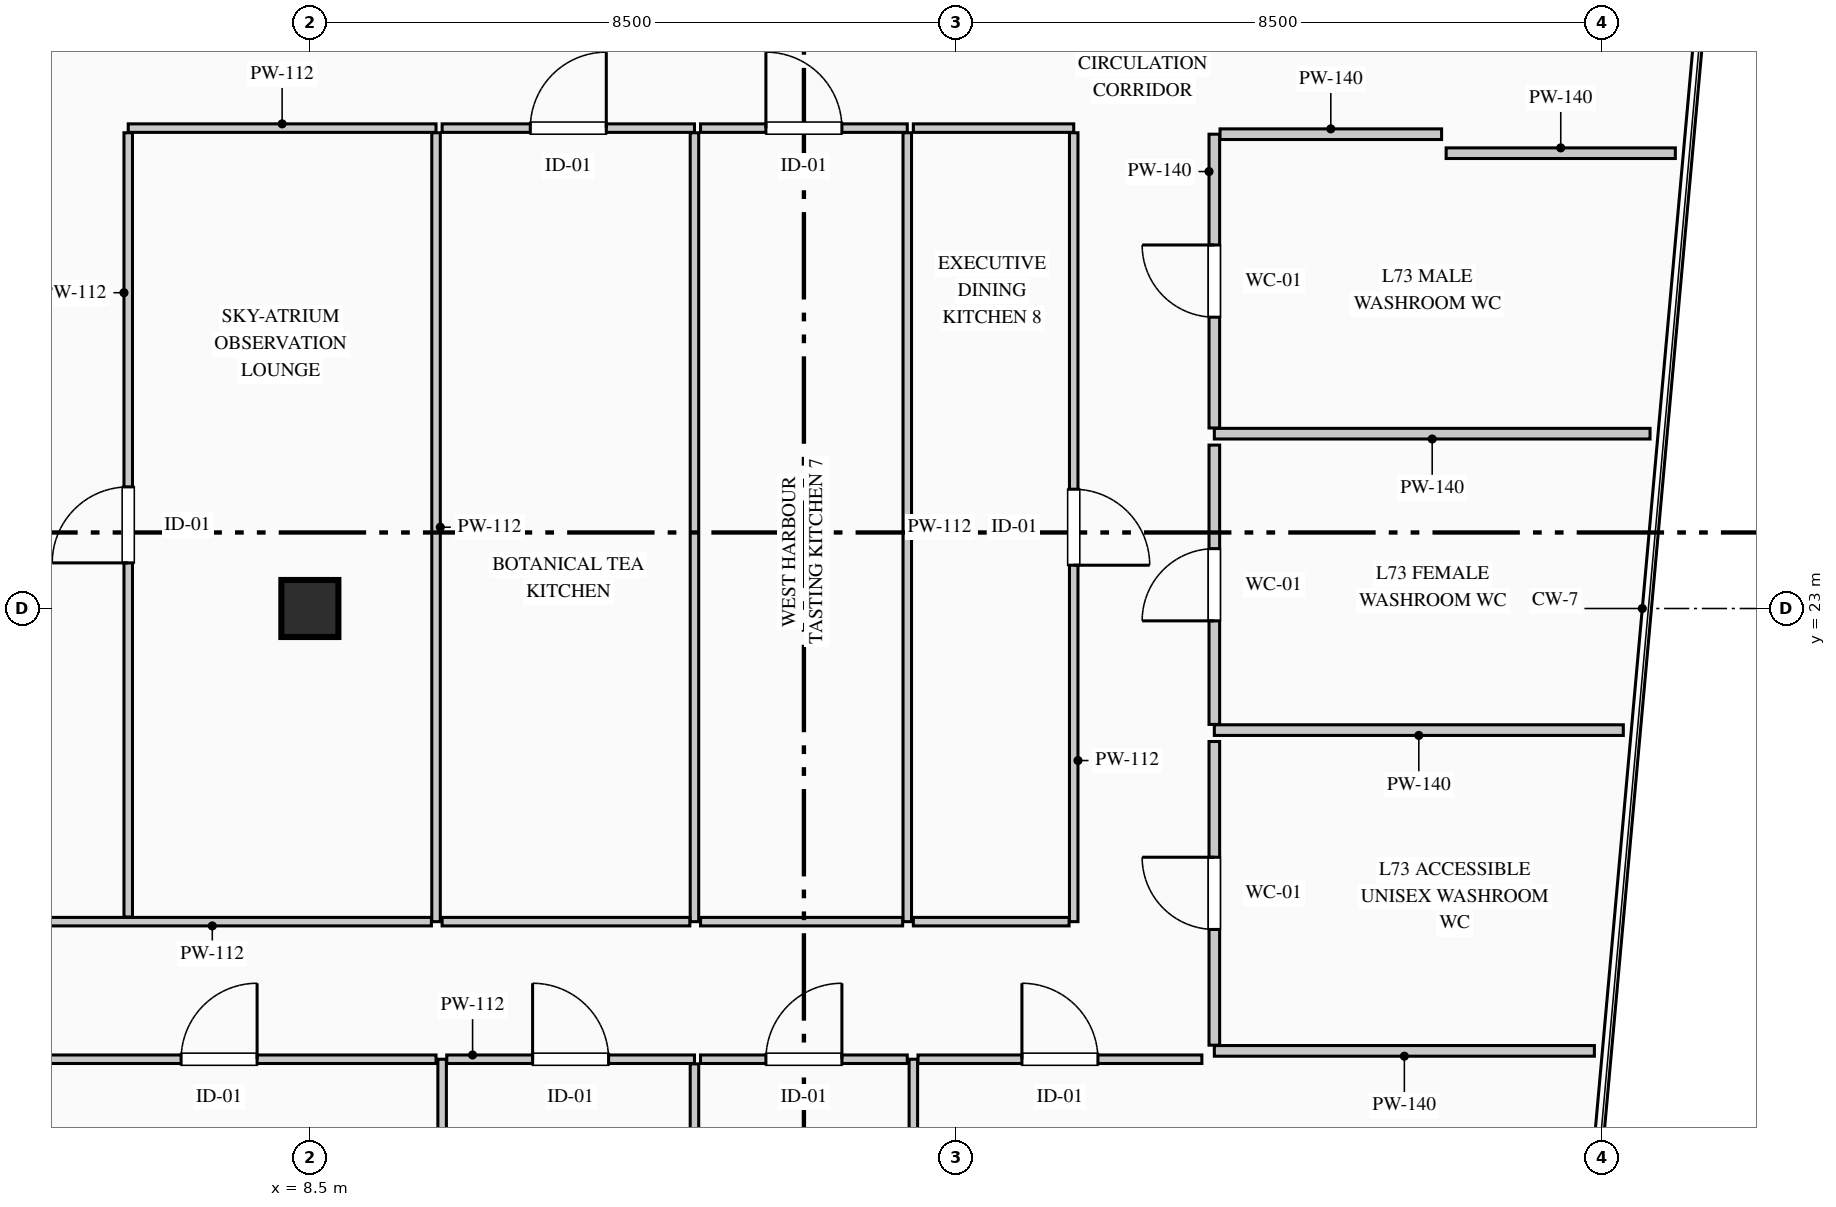
"""IFC4 building model, lengths in metres.
Left out: names, types, materials, properties, quantities, classifications, styles, units other than length and angle.
Written with IfcOpenShell. Run it as: python <this file> out.ifc"""

import sys

from ifc_helpers import new_model, si_unit, direction, frame, frame_2d, origin, origin_2d, place, context, subcontext, project, spatial, rectangle, extrude, element, fill, save


model = new_model("IFC4")
c1 = context("Model", 3, precision=1e-05, world=origin(), true_north=direction((0.0, 1.0)))
c2 = subcontext(c1, "Body", "Model", "MODEL_VIEW")
j1 = project(units=[si_unit("LENGTHUNIT", "METRE"), si_unit("PLANEANGLEUNIT", "RADIAN")], contexts=[c1])
p1 = place(None, origin())
s1 = spatial("IfcSite", under=j1, at=p1, CompositionType="ELEMENT")
p2 = place(p1, origin())
s2 = spatial("IfcBuilding", under=s1, at=p2, CompositionType="ELEMENT")
p3 = place(p2, frame((0.0, 0.0, 304.1)))
s3 = spatial("IfcBuildingStorey", under=s2, at=p3, CompositionType="ELEMENT", Elevation=304.1)
p4 = place(p3, frame((8.5, 23.0, 0.0), z_axis=(0.0, 0.0, 1.0), x_axis=(1.0, 0.0, 0.0)))
e1 = element("IfcColumn", 1, at=p4, inside=s3, PredefinedType="COLUMN", context=c2, shape_type="SweptSolid", body=[
    extrude(rectangle(XDim=0.75, YDim=0.75, at=origin_2d()), origin(), (0.0, 0.0, 1.0), 3.95),
])
p5 = place(p3, frame((23.45, 28.99, 0.0), z_axis=(0.0, 0.0, 1.0), x_axis=(1.0, 0.0, 0.0)))
e2 = element("IfcWall", 2, at=p5, inside=s3, PredefinedType="PARTITIONING", context=c2, shape_type="SweptSolid", body=[
    extrude(rectangle(XDim=3.016, YDim=0.14, at=frame_2d((1.508, 0.0))), origin(), (0.0, 0.0, 1.0), 3.7),
])
p6 = place(p3, frame((26.133, 25.3, 0.0), z_axis=(0.0, 0.0, 1.0), x_axis=(-1.0, 0.0, 0.0)))
e3 = element("IfcWall", 3, at=p6, inside=s3, PredefinedType="PARTITIONING", context=c2, shape_type="SweptSolid", body=[
    extrude(rectangle(XDim=5.733, YDim=0.14, at=frame_2d((2.866, 0.0))), origin(), (0.0, 0.0, 1.0), 3.7),
])
p7 = place(p3, frame((20.4, 25.375, 0.0), z_axis=(0.0, 0.0, 1.0), x_axis=(0.0, 1.0, 0.0)))
e4 = element("IfcWall", 4, at=p7, inside=s3, PredefinedType="PARTITIONING", context=c2, shape_type="SweptSolid", body=[
    extrude(rectangle(XDim=3.865, YDim=0.14, at=frame_2d((1.933, 0.0))), origin(), (0.0, 0.0, 1.0), 3.7),
])
p8 = place(p7, frame((1.458, 0.0, 0.0)))
e5 = element("IfcOpeningElement", 5, at=p8, cuts=e4, PredefinedType="OPENING", context=c2, shape_type="SweptSolid", body=[
    extrude(rectangle(XDim=0.95, YDim=2.15, at=frame_2d((0.475, 1.075))), frame((0.0, 0.08, 0.0), z_axis=(0.0, -1.0, 0.0), x_axis=(1.0, 0.0, 0.0)), (0.0, 0.0, 1.0), 0.16),
])
p9 = place(p3, frame((20.475, 29.24, 0.0), z_axis=(0.0, 0.0, 1.0), x_axis=(1.0, 0.0, 0.0)))
e6 = element("IfcWall", 6, at=p9, inside=s3, PredefinedType="PARTITIONING", context=c2, shape_type="SweptSolid", body=[
    extrude(rectangle(XDim=2.915, YDim=0.14, at=frame_2d((1.458, 0.0))), origin(), (0.0, 0.0, 1.0), 3.7),
])
p10 = place(p3, frame((25.781, 21.4, 0.0), z_axis=(0.0, 0.0, 1.0), x_axis=(-1.0, 0.0, 0.0)))
e7 = element("IfcWall", 7, at=p10, inside=s3, PredefinedType="PARTITIONING", context=c2, shape_type="SweptSolid", body=[
    extrude(rectangle(XDim=5.381, YDim=0.14, at=frame_2d((2.69, 0.0))), origin(), (0.0, 0.0, 1.0), 3.7),
])
p11 = place(p3, frame((20.4, 21.475, 0.0), z_axis=(0.0, 0.0, 1.0), x_axis=(0.0, 1.0, 0.0)))
e8 = element("IfcWall", 8, at=p11, inside=s3, PredefinedType="PARTITIONING", context=c2, shape_type="SweptSolid", body=[
    extrude(rectangle(XDim=3.675, YDim=0.14, at=frame_2d((1.837, 0.0))), origin(), (0.0, 0.0, 1.0), 3.7),
])
p12 = place(p11, frame((1.363, 0.0, 0.0)))
e9 = element("IfcOpeningElement", 9, at=p12, cuts=e8, PredefinedType="OPENING", context=c2, shape_type="SweptSolid", body=[
    extrude(rectangle(XDim=0.95, YDim=2.15, at=frame_2d((0.475, 1.075))), frame((0.0, 0.08, 0.0), z_axis=(0.0, -1.0, 0.0), x_axis=(1.0, 0.0, 0.0)), (0.0, 0.0, 1.0), 0.16),
])
p13 = place(p3, frame((25.4, 17.18, 0.0), z_axis=(0.0, 0.0, 1.0), x_axis=(-1.0, 0.0, 0.0)))
e10 = element("IfcWall", 10, at=p13, inside=s3, PredefinedType="PARTITIONING", context=c2, shape_type="SweptSolid", body=[
    extrude(rectangle(XDim=5.0, YDim=0.14, at=frame_2d((2.5, 0.0))), origin(), (0.0, 0.0, 1.0), 3.7),
])
p14 = place(p3, frame((20.4, 17.255, 0.0), z_axis=(0.0, 0.0, 1.0), x_axis=(0.0, 1.0, 0.0)))
e11 = element("IfcWall", 11, at=p14, inside=s3, PredefinedType="PARTITIONING", context=c2, shape_type="SweptSolid", body=[
    extrude(rectangle(XDim=3.995, YDim=0.14, at=frame_2d((1.998, 0.0))), origin(), (0.0, 0.0, 1.0), 3.7),
])
p15 = place(p14, frame((1.522, 0.0, 0.0)))
e12 = element("IfcOpeningElement", 12, at=p15, cuts=e11, PredefinedType="OPENING", context=c2, shape_type="SweptSolid", body=[
    extrude(rectangle(XDim=0.95, YDim=2.15, at=frame_2d((0.475, 1.075))), frame((0.0, 0.08, 0.0), z_axis=(0.0, -1.0, 0.0), x_axis=(1.0, 0.0, 0.0)), (0.0, 0.0, 1.0), 0.16),
])
p16 = place(p3, frame((10.24, 2.745, 0.0), z_axis=(0.0, 0.0, 1.0), x_axis=(0.0, 1.0, 0.0)))
e13 = element("IfcWall", 13, at=p16, inside=s3, PredefinedType="PARTITIONING", context=c2, shape_type="SweptSolid", body=[
    extrude(rectangle(XDim=14.325, YDim=0.112, at=frame_2d((7.163, 0.0))), origin(), (0.0, 0.0, 1.0), 3.325),
])
p17 = place(p3, frame((10.301, 17.07, 0.0), z_axis=(0.0, 0.0, 1.0), x_axis=(1.0, 0.0, 0.0)))
e14 = element("IfcWall", 14, at=p17, inside=s3, PredefinedType="PARTITIONING", context=c2, shape_type="SweptSolid", body=[
    extrude(rectangle(XDim=3.259, YDim=0.112, at=frame_2d((1.629, 0.0))), origin(), (0.0, 0.0, 1.0), 3.7),
])
p18 = place(p17, frame((1.129, 0.0, 0.0)))
e15 = element("IfcOpeningElement", 15, at=p18, cuts=e14, PredefinedType="OPENING", context=c2, shape_type="SweptSolid", body=[
    extrude(rectangle(XDim=1.0, YDim=2.15, at=frame_2d((0.5, 1.075))), frame((0.0, 0.066, 0.0), z_axis=(0.0, -1.0, 0.0), x_axis=(1.0, 0.0, 0.0)), (0.0, 0.0, 1.0), 0.132),
])
p19 = place(p3, frame((13.56, 17.009, 0.0), z_axis=(0.0, 0.0, 1.0), x_axis=(0.0, -1.0, 0.0)))
e16 = element("IfcWall", 16, at=p19, inside=s3, PredefinedType="PARTITIONING", context=c2, shape_type="SweptSolid", body=[
    extrude(rectangle(XDim=11.951, YDim=0.112, at=frame_2d((5.976, 0.0))), origin(), (0.0, 0.0, 1.0), 3.7),
])
p20 = place(p3, frame((4.451, 17.07, 0.0), z_axis=(0.0, 0.0, 1.0), x_axis=(1.0, 0.0, 0.0)))
e17 = element("IfcWall", 17, at=p20, inside=s3, PredefinedType="PARTITIONING", context=c2, shape_type="SweptSolid", body=[
    extrude(rectangle(XDim=5.708, YDim=0.112, at=frame_2d((2.854, 0.0))), origin(), (0.0, 0.0, 1.0), 3.7),
])
p21 = place(p20, frame((2.354, 0.0, 0.0)))
e18 = element("IfcOpeningElement", 18, at=p21, cuts=e17, PredefinedType="OPENING", context=c2, shape_type="SweptSolid", body=[
    extrude(rectangle(XDim=1.0, YDim=2.15, at=frame_2d((0.5, 1.075))), frame((0.0, 0.066, 0.0), z_axis=(0.0, -1.0, 0.0), x_axis=(1.0, 0.0, 0.0)), (0.0, 0.0, 1.0), 0.132),
])
p22 = place(p3, frame((16.44, 10.125, 0.0), z_axis=(0.0, 0.0, 1.0), x_axis=(0.0, 1.0, 0.0)))
e19 = element("IfcWall", 19, at=p22, inside=s3, PredefinedType="PARTITIONING", context=c2, shape_type="SweptSolid", body=[
    extrude(rectangle(XDim=6.945, YDim=0.112, at=frame_2d((3.473, 0.0))), origin(), (0.0, 0.0, 1.0), 3.7),
])
p23 = place(p3, frame((16.501, 17.07, 0.0), z_axis=(0.0, 0.0, 1.0), x_axis=(1.0, 0.0, 0.0)))
e20 = element("IfcWall", 20, at=p23, inside=s3, PredefinedType="PARTITIONING", context=c2, shape_type="SweptSolid", body=[
    extrude(rectangle(XDim=3.735, YDim=0.112, at=frame_2d((1.868, 0.0))), origin(), (0.0, 0.0, 1.0), 3.7),
])
p24 = place(p23, frame((1.367, 0.0, 0.0)))
e21 = element("IfcOpeningElement", 21, at=p24, cuts=e20, PredefinedType="OPENING", context=c2, shape_type="SweptSolid", body=[
    extrude(rectangle(XDim=1.0, YDim=2.15, at=frame_2d((0.5, 1.075))), frame((0.0, 0.066, 0.0), z_axis=(0.0, -1.0, 0.0), x_axis=(1.0, 0.0, 0.0)), (0.0, 0.0, 1.0), 0.132),
])
p25 = place(p3, frame((13.64, 17.07, 0.0), z_axis=(0.0, 0.0, 1.0), x_axis=(1.0, 0.0, 0.0)))
e22 = element("IfcWall", 22, at=p25, inside=s3, PredefinedType="PARTITIONING", context=c2, shape_type="SweptSolid", body=[
    extrude(rectangle(XDim=2.72, YDim=0.112, at=frame_2d((1.36, 0.0))), origin(), (0.0, 0.0, 1.0), 3.7),
])
p26 = place(p25, frame((0.86, 0.0, 0.0)))
e23 = element("IfcOpeningElement", 23, at=p26, cuts=e22, PredefinedType="OPENING", context=c2, shape_type="SweptSolid", body=[
    extrude(rectangle(XDim=1.0, YDim=2.15, at=frame_2d((0.5, 1.075))), frame((0.0, 0.066, 0.0), z_axis=(0.0, -1.0, 0.0), x_axis=(1.0, 0.0, 0.0)), (0.0, 0.0, 1.0), 0.132),
])
p27 = place(p3, frame((6.11, 29.32, 0.0), z_axis=(0.0, 0.0, 1.0), x_axis=(1.0, 0.0, 0.0)))
e24 = element("IfcWall", 24, at=p27, inside=s3, PredefinedType="PARTITIONING", context=c2, shape_type="SweptSolid", body=[
    extrude(rectangle(XDim=4.05, YDim=0.112, at=frame_2d((2.025, 0.0))), origin(), (0.0, 0.0, 1.0), 3.7),
])
p28 = place(p3, frame((10.16, 29.259, 0.0), z_axis=(0.0, 0.0, 1.0), x_axis=(0.0, -1.0, 0.0)))
e25 = element("IfcWall", 25, at=p28, inside=s3, PredefinedType="PARTITIONING", context=c2, shape_type="SweptSolid", body=[
    extrude(rectangle(XDim=10.379, YDim=0.112, at=frame_2d((5.189, 0.0))), origin(), (0.0, 0.0, 1.0), 3.325),
])
p29 = place(p3, frame((10.099, 18.88, 0.0), z_axis=(0.0, 0.0, 1.0), x_axis=(-1.0, 0.0, 0.0)))
e26 = element("IfcWall", 26, at=p29, inside=s3, PredefinedType="PARTITIONING", context=c2, shape_type="SweptSolid", body=[
    extrude(rectangle(XDim=5.766, YDim=0.112, at=frame_2d((2.883, 0.0))), origin(), (0.0, 0.0, 1.0), 3.7),
])
p30 = place(p3, frame((6.11, 18.941, 0.0), z_axis=(0.0, 0.0, 1.0), x_axis=(0.0, 1.0, 0.0)))
e27 = element("IfcWall", 27, at=p30, inside=s3, PredefinedType="PARTITIONING", context=c2, shape_type="SweptSolid", body=[
    extrude(rectangle(XDim=10.318, YDim=0.112, at=frame_2d((5.159, 0.0))), origin(), (0.0, 0.0, 1.0), 3.7),
])
p31 = place(p30, frame((4.659, 0.0, 0.0)))
e28 = element("IfcOpeningElement", 28, at=p31, cuts=e27, PredefinedType="OPENING", context=c2, shape_type="SweptSolid", body=[
    extrude(rectangle(XDim=1.0, YDim=2.15, at=frame_2d((0.5, 1.075))), frame((0.0, 0.066, 0.0), z_axis=(0.0, -1.0, 0.0), x_axis=(1.0, 0.0, 0.0)), (0.0, 0.0, 1.0), 0.132),
])
p32 = place(p3, frame((10.24, 29.32, 0.0), z_axis=(0.0, 0.0, 1.0), x_axis=(1.0, 0.0, 0.0)))
e29 = element("IfcWall", 29, at=p32, inside=s3, PredefinedType="PARTITIONING", context=c2, shape_type="SweptSolid", body=[
    extrude(rectangle(XDim=3.32, YDim=0.112, at=frame_2d((1.66, 0.0))), origin(), (0.0, 0.0, 1.0), 3.7),
])
p33 = place(p32, frame((1.16, 0.0, 0.0)))
e30 = element("IfcOpeningElement", 30, at=p33, cuts=e29, PredefinedType="OPENING", context=c2, shape_type="SweptSolid", body=[
    extrude(rectangle(XDim=1.0, YDim=2.15, at=frame_2d((0.5, 1.075))), frame((0.0, 0.066, 0.0), z_axis=(0.0, -1.0, 0.0), x_axis=(1.0, 0.0, 0.0)), (0.0, 0.0, 1.0), 0.132),
])
p34 = place(p3, frame((13.56, 29.259, 0.0), z_axis=(0.0, 0.0, 1.0), x_axis=(0.0, -1.0, 0.0)))
e31 = element("IfcWall", 31, at=p34, inside=s3, PredefinedType="PARTITIONING", context=c2, shape_type="SweptSolid", body=[
    extrude(rectangle(XDim=10.379, YDim=0.112, at=frame_2d((5.189, 0.0))), origin(), (0.0, 0.0, 1.0), 3.7),
])
p35 = place(p3, frame((13.499, 18.88, 0.0), z_axis=(0.0, 0.0, 1.0), x_axis=(-1.0, 0.0, 0.0)))
e32 = element("IfcWall", 32, at=p35, inside=s3, PredefinedType="PARTITIONING", context=c2, shape_type="SweptSolid", body=[
    extrude(rectangle(XDim=3.259, YDim=0.112, at=frame_2d((1.629, 0.0))), origin(), (0.0, 0.0, 1.0), 3.7),
])
p36 = place(p3, frame((13.64, 29.32, 0.0), z_axis=(0.0, 0.0, 1.0), x_axis=(1.0, 0.0, 0.0)))
e33 = element("IfcWall", 33, at=p36, inside=s3, PredefinedType="PARTITIONING", context=c2, shape_type="SweptSolid", body=[
    extrude(rectangle(XDim=2.72, YDim=0.112, at=frame_2d((1.36, 0.0))), origin(), (0.0, 0.0, 1.0), 3.7),
])
p37 = place(p36, frame((0.86, 0.0, 0.0)))
e34 = element("IfcOpeningElement", 34, at=p37, cuts=e33, PredefinedType="OPENING", context=c2, shape_type="SweptSolid", body=[
    extrude(rectangle(XDim=1.0, YDim=2.15, at=frame_2d((0.5, 1.075))), frame((0.0, 0.066, 0.0), z_axis=(0.0, -1.0, 0.0), x_axis=(1.0, 0.0, 0.0)), (0.0, 0.0, 1.0), 0.132),
])
p38 = place(p3, frame((16.36, 29.259, 0.0), z_axis=(0.0, 0.0, 1.0), x_axis=(0.0, -1.0, 0.0)))
e35 = element("IfcWall", 35, at=p38, inside=s3, PredefinedType="PARTITIONING", context=c2, shape_type="SweptSolid", body=[
    extrude(rectangle(XDim=10.379, YDim=0.112, at=frame_2d((5.189, 0.0))), origin(), (0.0, 0.0, 1.0), 3.7),
])
p39 = place(p3, frame((16.299, 18.88, 0.0), z_axis=(0.0, 0.0, 1.0), x_axis=(-1.0, 0.0, 0.0)))
e36 = element("IfcWall", 36, at=p39, inside=s3, PredefinedType="PARTITIONING", context=c2, shape_type="SweptSolid", body=[
    extrude(rectangle(XDim=2.659, YDim=0.112, at=frame_2d((1.33, 0.0))), origin(), (0.0, 0.0, 1.0), 3.7),
])
p40 = place(p3, frame((16.44, 29.32, 0.0), z_axis=(0.0, 0.0, 1.0), x_axis=(1.0, 0.0, 0.0)))
e37 = element("IfcWall", 37, at=p40, inside=s3, PredefinedType="PARTITIONING", context=c2, shape_type="SweptSolid", body=[
    extrude(rectangle(XDim=2.11, YDim=0.112, at=frame_2d((1.055, 0.0))), origin(), (0.0, 0.0, 1.0), 3.7),
])
p41 = place(p3, frame((18.55, 29.259, 0.0), z_axis=(0.0, 0.0, 1.0), x_axis=(0.0, -1.0, 0.0)))
e38 = element("IfcWall", 38, at=p41, inside=s3, PredefinedType="PARTITIONING", context=c2, shape_type="SweptSolid", body=[
    extrude(rectangle(XDim=10.379, YDim=0.112, at=frame_2d((5.189, 0.0))), origin(), (0.0, 0.0, 1.0), 3.7),
])
p42 = place(p41, frame((4.689, 0.0, 0.0)))
e39 = element("IfcOpeningElement", 39, at=p42, cuts=e38, PredefinedType="OPENING", context=c2, shape_type="SweptSolid", body=[
    extrude(rectangle(XDim=1.0, YDim=2.15, at=frame_2d((0.5, 1.075))), frame((0.0, 0.066, 0.0), z_axis=(0.0, -1.0, 0.0), x_axis=(1.0, 0.0, 0.0)), (0.0, 0.0, 1.0), 0.132),
])
p43 = place(p3, frame((18.489, 18.88, 0.0), z_axis=(0.0, 0.0, 1.0), x_axis=(-1.0, 0.0, 0.0)))
e40 = element("IfcWall", 40, at=p43, inside=s3, PredefinedType="PARTITIONING", context=c2, shape_type="SweptSolid", body=[
    extrude(rectangle(XDim=2.049, YDim=0.112, at=frame_2d((1.024, 0.0))), origin(), (0.0, 0.0, 1.0), 3.7),
])
p44 = place(p8, origin())
e41 = element("IfcDoor", 41, at=p44, inside=s3, OperationType="SINGLE_SWING_RIGHT", PredefinedType="DOOR", context=c2, shape_type="SweptSolid", body=[
    extrude(rectangle(XDim=0.95, YDim=2.15, at=frame_2d((0.475, 1.075))), frame((0.0, 0.025, 0.0), z_axis=(0.0, -1.0, 0.0), x_axis=(1.0, 0.0, 0.0)), (0.0, 0.0, 1.0), 0.05),
])
fill(e5, e41)
p45 = place(p12, origin())
e42 = element("IfcDoor", 42, at=p45, inside=s3, OperationType="SINGLE_SWING_LEFT", PredefinedType="DOOR", context=c2, shape_type="SweptSolid", body=[
    extrude(rectangle(XDim=0.95, YDim=2.15, at=frame_2d((0.475, 1.075))), frame((0.0, 0.025, 0.0), z_axis=(0.0, -1.0, 0.0), x_axis=(1.0, 0.0, 0.0)), (0.0, 0.0, 1.0), 0.05),
])
fill(e9, e42)
p46 = place(p15, origin())
e43 = element("IfcDoor", 43, at=p46, inside=s3, OperationType="SINGLE_SWING_RIGHT", PredefinedType="DOOR", context=c2, shape_type="SweptSolid", body=[
    extrude(rectangle(XDim=0.95, YDim=2.15, at=frame_2d((0.475, 1.075))), frame((0.0, 0.025, 0.0), z_axis=(0.0, -1.0, 0.0), x_axis=(1.0, 0.0, 0.0)), (0.0, 0.0, 1.0), 0.05),
])
fill(e12, e43)
p47 = place(p18, origin())
e44 = element("IfcDoor", 44, at=p47, inside=s3, OperationType="SINGLE_SWING_LEFT", PredefinedType="DOOR", context=c2, shape_type="SweptSolid", body=[
    extrude(rectangle(XDim=1.0, YDim=2.15, at=frame_2d((0.5, 1.075))), frame((0.0, 0.025, 0.0), z_axis=(0.0, -1.0, 0.0), x_axis=(1.0, 0.0, 0.0)), (0.0, 0.0, 1.0), 0.05),
])
fill(e15, e44)
p48 = place(p21, origin())
e45 = element("IfcDoor", 45, at=p48, inside=s3, OperationType="SINGLE_SWING_RIGHT", PredefinedType="DOOR", context=c2, shape_type="SweptSolid", body=[
    extrude(rectangle(XDim=1.0, YDim=2.15, at=frame_2d((0.5, 1.075))), frame((0.0, 0.025, 0.0), z_axis=(0.0, -1.0, 0.0), x_axis=(1.0, 0.0, 0.0)), (0.0, 0.0, 1.0), 0.05),
])
fill(e18, e45)
p49 = place(p24, origin())
e46 = element("IfcDoor", 46, at=p49, inside=s3, OperationType="SINGLE_SWING_LEFT", PredefinedType="DOOR", context=c2, shape_type="SweptSolid", body=[
    extrude(rectangle(XDim=1.0, YDim=2.15, at=frame_2d((0.5, 1.075))), frame((0.0, 0.025, 0.0), z_axis=(0.0, -1.0, 0.0), x_axis=(1.0, 0.0, 0.0)), (0.0, 0.0, 1.0), 0.05),
])
fill(e21, e46)
p50 = place(p26, origin())
e47 = element("IfcDoor", 47, at=p50, inside=s3, OperationType="SINGLE_SWING_RIGHT", PredefinedType="DOOR", context=c2, shape_type="SweptSolid", body=[
    extrude(rectangle(XDim=1.0, YDim=2.15, at=frame_2d((0.5, 1.075))), frame((0.0, 0.025, 0.0), z_axis=(0.0, -1.0, 0.0), x_axis=(1.0, 0.0, 0.0)), (0.0, 0.0, 1.0), 0.05),
])
fill(e23, e47)
p51 = place(p31, origin())
e48 = element("IfcDoor", 48, at=p51, inside=s3, OperationType="SINGLE_SWING_LEFT", PredefinedType="DOOR", context=c2, shape_type="SweptSolid", body=[
    extrude(rectangle(XDim=1.0, YDim=2.15, at=frame_2d((0.5, 1.075))), frame((0.0, 0.025, 0.0), z_axis=(0.0, -1.0, 0.0), x_axis=(1.0, 0.0, 0.0)), (0.0, 0.0, 1.0), 0.05),
])
fill(e28, e48)
p52 = place(p33, origin())
e49 = element("IfcDoor", 49, at=p52, inside=s3, OperationType="SINGLE_SWING_RIGHT", PredefinedType="DOOR", context=c2, shape_type="SweptSolid", body=[
    extrude(rectangle(XDim=1.0, YDim=2.15, at=frame_2d((0.5, 1.075))), frame((0.0, 0.025, 0.0), z_axis=(0.0, -1.0, 0.0), x_axis=(1.0, 0.0, 0.0)), (0.0, 0.0, 1.0), 0.05),
])
fill(e30, e49)
p53 = place(p37, origin())
e50 = element("IfcDoor", 50, at=p53, inside=s3, OperationType="SINGLE_SWING_LEFT", PredefinedType="DOOR", context=c2, shape_type="SweptSolid", body=[
    extrude(rectangle(XDim=1.0, YDim=2.15, at=frame_2d((0.5, 1.075))), frame((0.0, 0.025, 0.0), z_axis=(0.0, -1.0, 0.0), x_axis=(1.0, 0.0, 0.0)), (0.0, 0.0, 1.0), 0.05),
])
fill(e34, e50)
p54 = place(p42, origin())
e51 = element("IfcDoor", 51, at=p54, inside=s3, OperationType="SINGLE_SWING_RIGHT", PredefinedType="DOOR", context=c2, shape_type="SweptSolid", body=[
    extrude(rectangle(XDim=1.0, YDim=2.15, at=frame_2d((0.5, 1.075))), frame((0.0, 0.025, 0.0), z_axis=(0.0, -1.0, 0.0), x_axis=(1.0, 0.0, 0.0)), (0.0, 0.0, 1.0), 0.05),
])
fill(e39, e51)
save(model, sys.argv[1])
